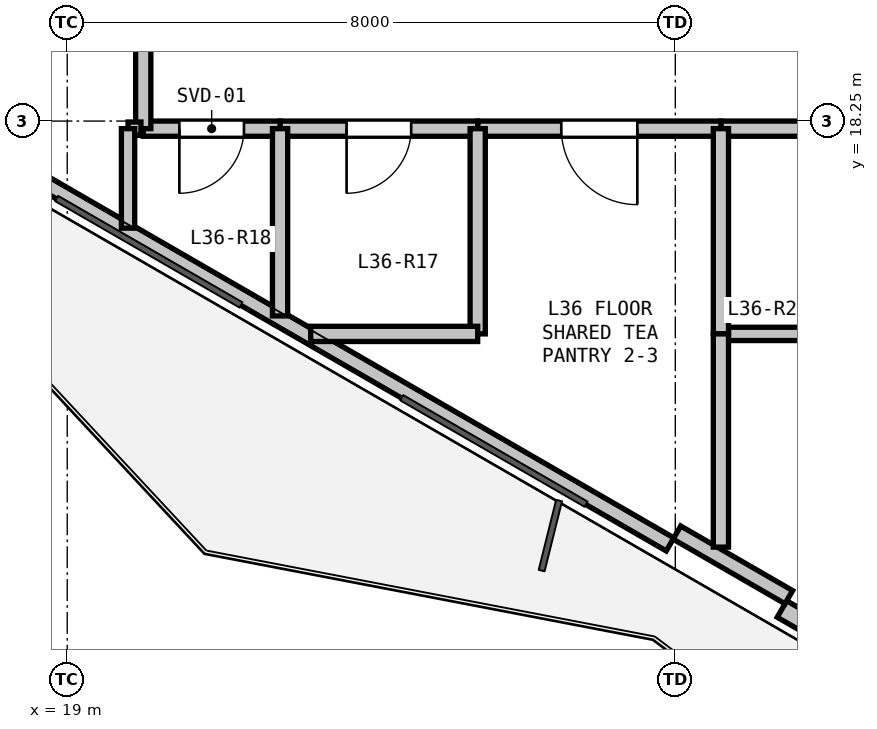
"""IFC4 building model, lengths in metres.
Left out: names, types, materials, properties, quantities, classifications, styles, units other than length and angle.
Written with IfcOpenShell. Run it as: python <this file> out.ifc"""

import sys

from ifc_helpers import new_model, si_unit, direction, frame, frame_2d, origin, place, context, subcontext, project, spatial, rectangle, extrude, element, fill, save


model = new_model("IFC4")
c1 = context("Model", 3, precision=1e-05, world=origin(), true_north=direction((0.0, 1.0)))
c2 = subcontext(c1, "Body", "Model", "MODEL_VIEW")
j1 = project(units=[si_unit("LENGTHUNIT", "METRE"), si_unit("PLANEANGLEUNIT", "RADIAN")], contexts=[c1])
p1 = place(None, origin())
s1 = spatial("IfcSite", under=j1, at=p1, CompositionType="ELEMENT")
p2 = place(p1, origin())
s2 = spatial("IfcBuilding", under=s1, at=p2, CompositionType="ELEMENT")
p3 = place(p2, frame((0.0, 0.0, 131.1)))
s3 = spatial("IfcBuildingStorey", under=s2, at=p3, CompositionType="ELEMENT", Elevation=131.1)
p4 = place(p3, frame((38.091, 6.237, 0.0), z_axis=(0.0, 0.0, 1.0), x_axis=(-0.86602239209, 0.500005216371, 0.0)))
e1 = element("IfcWall", 1, at=p4, inside=s3, PredefinedType="SOLIDWALL", context=c2, shape_type="SweptSolid", body=[
    extrude(rectangle(XDim=11.186, YDim=0.25, at=frame_2d((5.593, 0.0))), origin(), (0.0, 0.0, 1.0), 2.68),
])
p5 = place(p4, frame((7.095, 0.0, 0.0)))
e2 = element("IfcOpeningElement", 2, at=p5, cuts=e1, PredefinedType="OPENING", context=c2, shape_type="SweptSolid", body=[
    extrude(rectangle(XDim=1.0, YDim=2.1, at=frame_2d((0.5, 1.05))), frame((0.0, 0.135, 0.0), z_axis=(0.0, -1.0, 0.0), x_axis=(1.0, 0.0, 0.0)), (0.0, 0.0, 1.0), 0.27),
])
p6 = place(p4, frame((2.02, 0.0, 0.9)))
e3 = element("IfcOpeningElement", 3, at=p6, cuts=e1, PredefinedType="OPENING", context=c2, shape_type="SweptSolid", body=[
    extrude(rectangle(XDim=1.2, YDim=1.4, at=frame_2d((0.6, 0.7))), frame((0.0, 0.135, 0.0), z_axis=(0.0, -1.0, 0.0), x_axis=(1.0, 0.0, 0.0)), (0.0, 0.0, 1.0), 0.27),
])
p7 = place(p3, frame((26.931, 12.68, 0.0), z_axis=(0.0, 0.0, 1.0), x_axis=(-0.866026619769, 0.499997893847, 0.0)))
e4 = element("IfcWall", 4, at=p7, inside=s3, PredefinedType="PARAPET", context=c2, shape_type="SweptSolid", body=[
    extrude(rectangle(XDim=10.486, YDim=0.2, at=frame_2d((5.243, 0.0))), origin(), (0.0, 0.0, 1.0), 0.2),
])
p8 = place(p3, frame((28.493, 11.986, 0.0), z_axis=(0.0, 0.0, 1.0), x_axis=(-0.86605165483, 0.499954529098, 0.0)))
e5 = element("IfcWall", 5, at=p8, inside=s3, PredefinedType="PARAPET", context=c2, shape_type="SweptSolid", body=[
    extrude(rectangle(XDim=1.7, YDim=0.2, at=frame_2d((0.85, 0.0))), origin(), (0.0, 0.0, 1.0), 2.68),
])
p9 = place(p3, frame((29.6, 18.15, 0.0), z_axis=(0.0, 0.0, 1.0), x_axis=(-1.0, 0.0, 0.0)))
e6 = element("IfcWall", 6, at=p9, inside=s3, PredefinedType="PARTITIONING", context=c2, shape_type="SweptSolid", body=[
    extrude(rectangle(XDim=2.0, YDim=0.2, at=frame_2d((1.0, 0.0))), origin(), (0.0, 0.0, 1.0), 3.06),
])
p10 = place(p3, frame((27.6, 18.15, 0.0), z_axis=(0.0, 0.0, 1.0), x_axis=(-1.0, 0.0, 0.0)))
e7 = element("IfcWall", 7, at=p10, inside=s3, PredefinedType="PARTITIONING", context=c2, shape_type="SweptSolid", body=[
    extrude(rectangle(XDim=3.2, YDim=0.2, at=frame_2d((1.6, 0.0))), origin(), (0.0, 0.0, 1.0), 2.433),
])
p11 = place(p10, frame((1.1, 0.0, 0.0)))
e8 = element("IfcOpeningElement", 8, at=p11, cuts=e7, PredefinedType="OPENING", context=c2, shape_type="SweptSolid", body=[
    extrude(rectangle(XDim=1.0, YDim=2.15, at=frame_2d((0.5, 1.075))), frame((0.0, 0.11, 0.0), z_axis=(0.0, -1.0, 0.0), x_axis=(1.0, 0.0, 0.0)), (0.0, 0.0, 1.0), 0.22),
])
p12 = place(p3, frame((24.4, 18.15, 0.0), z_axis=(0.0, 0.0, 1.0), x_axis=(-1.0, 0.0, 0.0)))
e9 = element("IfcWall", 9, at=p12, inside=s3, PredefinedType="PARTITIONING", context=c2, shape_type="SweptSolid", body=[
    extrude(rectangle(XDim=2.6, YDim=0.2, at=frame_2d((1.3, 0.0))), origin(), (0.0, 0.0, 1.0), 2.433),
])
p13 = place(p12, frame((0.875, 0.0, 0.0)))
e10 = element("IfcOpeningElement", 10, at=p13, cuts=e9, PredefinedType="OPENING", context=c2, shape_type="SweptSolid", body=[
    extrude(rectangle(XDim=0.85, YDim=2.1, at=frame_2d((0.425, 1.05))), frame((0.0, 0.11, 0.0), z_axis=(0.0, -1.0, 0.0), x_axis=(1.0, 0.0, 0.0)), (0.0, 0.0, 1.0), 0.22),
])
p14 = place(p3, frame((21.8, 18.15, 0.0), z_axis=(0.0, 0.0, 1.0), x_axis=(-1.0, 0.0, 0.0)))
e11 = element("IfcWall", 11, at=p14, inside=s3, PredefinedType="PARTITIONING", context=c2, shape_type="SweptSolid", body=[
    extrude(rectangle(XDim=1.8, YDim=0.2, at=frame_2d((0.9, 0.0))), origin(), (0.0, 0.0, 1.0), 3.06),
])
p15 = place(p14, frame((0.475, 0.0, 0.0)))
e12 = element("IfcOpeningElement", 12, at=p15, cuts=e11, PredefinedType="OPENING", context=c2, shape_type="SweptSolid", body=[
    extrude(rectangle(XDim=0.85, YDim=2.1, at=frame_2d((0.425, 1.05))), frame((0.0, 0.11, 0.0), z_axis=(0.0, -1.0, 0.0), x_axis=(1.0, 0.0, 0.0)), (0.0, 0.0, 1.0), 0.22),
])
p16 = place(p3, frame((20.0, 18.15, 0.0), z_axis=(0.0, 0.0, 1.0), x_axis=(0.0, 1.0, 0.0)))
e13 = element("IfcWall", 13, at=p16, inside=s3, PredefinedType="PARTITIONING", context=c2, shape_type="SweptSolid", body=[
    extrude(rectangle(XDim=2.6, YDim=0.2, at=frame_2d((1.3, 0.0))), origin(), (0.0, 0.0, 1.0), 3.06),
])
p17 = place(p3, frame((19.8, 18.15, 0.0), z_axis=(0.0, 0.0, 1.0), x_axis=(1.0, 0.0, 0.0)))
e14 = element("IfcWall", 14, at=p17, inside=s3, PredefinedType="PLUMBINGWALL", context=c2, shape_type="SweptSolid", body=[
    extrude(rectangle(XDim=0.17, YDim=0.175, at=frame_2d((0.085, 0.0))), origin(), (0.0, 0.0, 1.0), 3.06),
])
p18 = place(p3, frame((21.8, 18.15, 0.0), z_axis=(0.0, 0.0, 1.0), x_axis=(0.0, -1.0, 0.0)))
e15 = element("IfcWall", 15, at=p18, inside=s3, PredefinedType="PARTITIONING", context=c2, shape_type="SweptSolid", body=[
    extrude(rectangle(XDim=2.463, YDim=0.2, at=frame_2d((1.232, 0.0))), origin(), (0.0, 0.0, 1.0), 2.365),
])
p19 = place(p3, frame((19.8, 16.841, 0.0), z_axis=(0.0, 0.0, 1.0), x_axis=(0.0, 1.0, 0.0)))
e16 = element("IfcWall", 16, at=p19, inside=s3, PredefinedType="PLUMBINGWALL", context=c2, shape_type="SweptSolid", body=[
    extrude(rectangle(XDim=1.309, YDim=0.175, at=frame_2d((0.654, 0.0))), origin(), (0.0, 0.0, 1.0), 2.365),
])
p20 = place(p3, frame((29.6, 15.45, 0.0), z_axis=(0.0, 0.0, 1.0), x_axis=(-1.0, 0.0, 0.0)))
e17 = element("IfcWall", 17, at=p20, inside=s3, PredefinedType="PLUMBINGWALL", context=c2, shape_type="SweptSolid", body=[
    extrude(rectangle(XDim=2.0, YDim=0.175, at=frame_2d((1.0, 0.0))), origin(), (0.0, 0.0, 1.0), 3.06),
])
p21 = place(p3, frame((27.6, 15.45, 0.0), z_axis=(0.0, 0.0, 1.0), x_axis=(0.0, 1.0, 0.0)))
e18 = element("IfcWall", 18, at=p21, inside=s3, PredefinedType="PARTITIONING", context=c2, shape_type="SweptSolid", body=[
    extrude(rectangle(XDim=2.7, YDim=0.2, at=frame_2d((1.35, 0.0))), origin(), (0.0, 0.0, 1.0), 3.06),
])
p22 = place(p3, frame((24.4, 18.15, 0.0), z_axis=(0.0, 0.0, 1.0), x_axis=(0.0, -1.0, 0.0)))
e19 = element("IfcWall", 19, at=p22, inside=s3, PredefinedType="PARTITIONING", context=c2, shape_type="SweptSolid", body=[
    extrude(rectangle(XDim=2.7, YDim=0.2, at=frame_2d((1.35, 0.0))), origin(), (0.0, 0.0, 1.0), 2.433),
])
p23 = place(p3, frame((24.4, 15.45, 0.0), z_axis=(0.0, 0.0, 1.0), x_axis=(-1.0, 0.0, 0.0)))
e20 = element("IfcWall", 20, at=p23, inside=s3, PredefinedType="PARTITIONING", context=c2, shape_type="SweptSolid", body=[
    extrude(rectangle(XDim=2.197, YDim=0.2, at=frame_2d((1.099, 0.0))), origin(), (0.0, 0.0, 1.0), 2.365),
])
p24 = place(p3, frame((27.6, 15.45, 0.0), z_axis=(0.0, 0.0, 1.0), x_axis=(0.0, -1.0, 0.0)))
e21 = element("IfcWall", 21, at=p24, inside=s3, PredefinedType="PARTITIONING", context=c2, shape_type="SweptSolid", body=[
    extrude(rectangle(XDim=2.805, YDim=0.2, at=frame_2d((1.402, 0.0))), origin(), (0.0, 0.0, 1.0), 2.365),
])
p25 = place(p15, origin())
e22 = element("IfcDoor", 22, at=p25, inside=s3, OperationType="SINGLE_SWING_RIGHT", PredefinedType="DOOR", context=c2, shape_type="SweptSolid", body=[
    extrude(rectangle(XDim=0.85, YDim=2.1, at=frame_2d((0.425, 1.05))), frame((0.0, 0.025, 0.0), z_axis=(0.0, -1.0, 0.0), x_axis=(1.0, 0.0, 0.0)), (0.0, 0.0, 1.0), 0.05),
])
fill(e12, e22)
p26 = place(p13, origin())
e23 = element("IfcDoor", 23, at=p26, inside=s3, OperationType="SINGLE_SWING_RIGHT", PredefinedType="DOOR", context=c2, shape_type="SweptSolid", body=[
    extrude(rectangle(XDim=0.85, YDim=2.1, at=frame_2d((0.425, 1.05))), frame((0.0, 0.025, 0.0), z_axis=(0.0, -1.0, 0.0), x_axis=(1.0, 0.0, 0.0)), (0.0, 0.0, 1.0), 0.05),
])
fill(e10, e23)
p27 = place(p11, origin())
e24 = element("IfcDoor", 24, at=p27, inside=s3, OperationType="SINGLE_SWING_LEFT", PredefinedType="DOOR", context=c2, shape_type="SweptSolid", body=[
    extrude(rectangle(XDim=1.0, YDim=2.15, at=frame_2d((0.5, 1.075))), frame((0.0, 0.025, 0.0), z_axis=(0.0, -1.0, 0.0), x_axis=(1.0, 0.0, 0.0)), (0.0, 0.0, 1.0), 0.05),
])
fill(e8, e24)
save(model, sys.argv[1])
